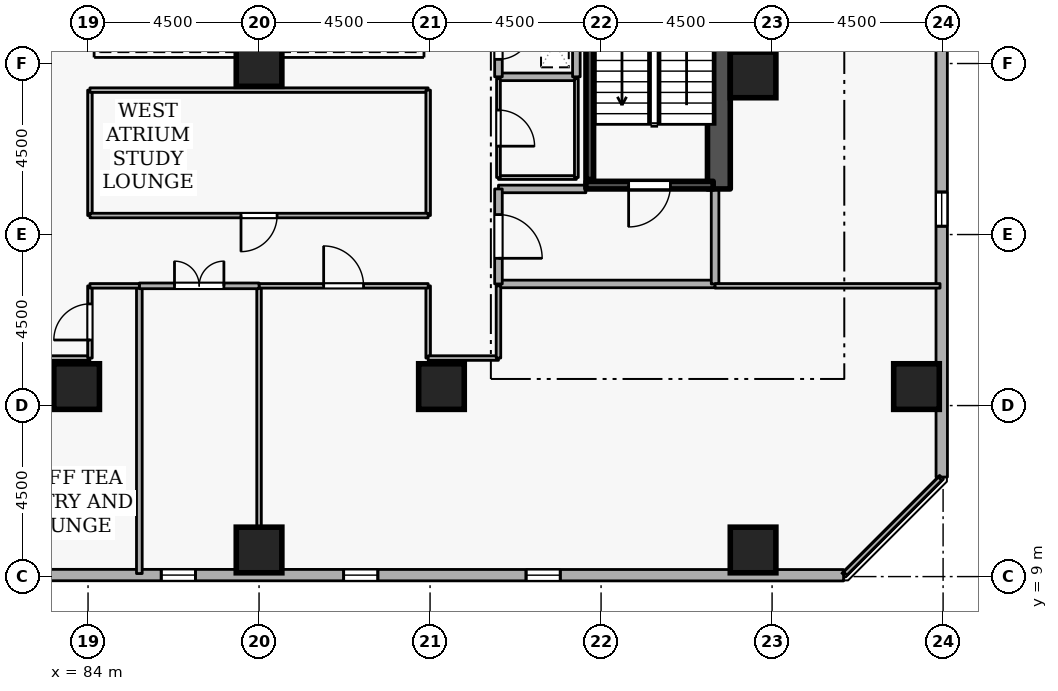
"""IFC4 building model, lengths in metres.
Left out: names, types, materials, properties, quantities, classifications, styles, units other than length and angle.
Written with IfcOpenShell. Run it as: python <this file> out.ifc"""

import sys

from ifc_helpers import new_model, si_unit, direction, frame, frame_2d, origin, origin_2d, place, context, subcontext, project, spatial, rectangle, extrude, element, fill, save


model = new_model("IFC4")
c1 = context("Model", 3, precision=1e-05, world=origin(), true_north=direction((0.0, 1.0)))
c2 = subcontext(c1, "Body", "Model", "MODEL_VIEW")
j1 = project(units=[si_unit("LENGTHUNIT", "METRE"), si_unit("PLANEANGLEUNIT", "RADIAN")], contexts=[c1])
p1 = place(None, origin())
s1 = spatial("IfcSite", under=j1, at=p1, CompositionType="ELEMENT")
p2 = place(p1, origin())
s2 = spatial("IfcBuilding", under=s1, at=p2, CompositionType="ELEMENT")
p3 = place(p2, frame((0.0, 0.0, 87.3)))
s3 = spatial("IfcBuildingStorey", under=s2, at=p3, CompositionType="ELEMENT", Elevation=87.3)
p4 = place(p3, frame((100.6, 19.2, 0.0), z_axis=(0.0, 0.0, 1.0), x_axis=(0.0, 1.0, 0.0)))
e1 = element("IfcWall", 1, at=p4, inside=s3, PredefinedType="SHEAR", context=c2, shape_type="SweptSolid", body=[
    extrude(rectangle(XDim=15.6, YDim=0.6, at=frame_2d((7.8, 0.0))), origin(), (0.0, 0.0, 1.0), 3.6),
])
for number, where, z_axis, x_axis in (
    (2, (105.8, 14.0, 0.0), (0.0, 0.0, 1.0), (1.0, 0.0, 0.0)),
    (3, (101.5, 9.7, 0.0), (0.0, 0.0, 1.0), (1.0, 0.0, 0.0)),
    (4, (88.5, 9.7, 0.0), (0.0, 0.0, 1.0), (1.0, 0.0, 0.0)),
    (5, (93.3, 14.0, 0.0), (0.0, 0.0, 1.0), (1.0, 0.0, 0.0)),
    (6, (83.7, 14.0, 0.0), (0.0, 0.0, 1.0), (1.0, 0.0, 0.0)),
    (7, (101.5, 22.2, 0.0), (0.0, 0.0, 1.0), (1.0, 0.0, 0.0)),
    (8, (88.5, 22.5, 0.0), (0.0, 0.0, 1.0), (1.0, 0.0, 0.0)),
):
    element("IfcColumn", number, at=place(p3, frame(where, z_axis=z_axis, x_axis=x_axis)), inside=s3, PredefinedType="COLUMN", context=c2, shape_type="SweptSolid", body=[
        extrude(rectangle(XDim=1.2, YDim=1.2, at=origin_2d()), origin(), (0.0, 0.0, 1.0), 3.6),
    ])
p5 = place(p3, frame((69.726, 9.044, 0.0), z_axis=(0.0, 0.0, 1.0), x_axis=(0.999999970468, -0.000243032466, 0.0)))
e9 = element("IfcWall", 9, at=p5, inside=s3, PredefinedType="STANDARD", context=c2, shape_type="SweptSolid", body=[
    extrude(rectangle(XDim=34.155, YDim=0.3, at=frame_2d((17.078, 0.0))), origin(), (0.0, 0.0, 1.0), 2.7),
])
p6 = place(p5, frame((1.8, 0.0, 0.72)))
e10 = element("IfcOpeningElement", 10, at=p6, cuts=e9, PredefinedType="OPENING", context=c2, shape_type="SweptSolid", body=[
    extrude(rectangle(XDim=0.9, YDim=1.75, at=frame_2d((0.45, 0.875))), frame((0.0, 0.16, 0.0), z_axis=(0.0, -1.0, 0.0), x_axis=(1.0, 0.0, 0.0)), (0.0, 0.0, 1.0), 0.32),
])
p7 = place(p5, frame((11.4, 0.0, 0.72)))
e11 = element("IfcOpeningElement", 11, at=p7, cuts=e9, PredefinedType="OPENING", context=c2, shape_type="SweptSolid", body=[
    extrude(rectangle(XDim=0.9, YDim=1.75, at=frame_2d((0.45, 0.875))), frame((0.0, 0.16, 0.0), z_axis=(0.0, -1.0, 0.0), x_axis=(1.0, 0.0, 0.0)), (0.0, 0.0, 1.0), 0.32),
])
p8 = place(p5, frame((16.2, 0.0, 0.72)))
e12 = element("IfcOpeningElement", 12, at=p8, cuts=e9, PredefinedType="OPENING", context=c2, shape_type="SweptSolid", body=[
    extrude(rectangle(XDim=0.9, YDim=1.75, at=frame_2d((0.45, 0.875))), frame((0.0, 0.16, 0.0), z_axis=(0.0, -1.0, 0.0), x_axis=(1.0, 0.0, 0.0)), (0.0, 0.0, 1.0), 0.32),
])
p9 = place(p5, frame((21.0, 0.0, 0.72)))
e13 = element("IfcOpeningElement", 13, at=p9, cuts=e9, PredefinedType="OPENING", context=c2, shape_type="SweptSolid", body=[
    extrude(rectangle(XDim=0.9, YDim=1.75, at=frame_2d((0.45, 0.875))), frame((0.0, 0.16, 0.0), z_axis=(0.0, -1.0, 0.0), x_axis=(1.0, 0.0, 0.0)), (0.0, 0.0, 1.0), 0.32),
])
p10 = place(p5, frame((25.8, 0.0, 0.72)))
e14 = element("IfcOpeningElement", 14, at=p10, cuts=e9, PredefinedType="OPENING", context=c2, shape_type="SweptSolid", body=[
    extrude(rectangle(XDim=0.9, YDim=1.75, at=frame_2d((0.45, 0.875))), frame((0.0, 0.16, 0.0), z_axis=(0.0, -1.0, 0.0), x_axis=(1.0, 0.0, 0.0)), (0.0, 0.0, 1.0), 0.32),
])
p11 = place(p3, frame((106.465, 11.619, 0.0), z_axis=(0.0, 0.0, 1.0), x_axis=(-0.000243032466, 0.999999970468, 0.0)))
e15 = element("IfcWall", 15, at=p11, inside=s3, PredefinedType="STANDARD", context=c2, shape_type="SweptSolid", body=[
    extrude(rectangle(XDim=34.155, YDim=0.3, at=frame_2d((17.078, 0.0))), origin(), (0.0, 0.0, 1.0), 2.7),
])
p12 = place(p11, frame((6.6, 0.0, 0.72)))
e16 = element("IfcOpeningElement", 16, at=p12, cuts=e15, PredefinedType="OPENING", context=c2, shape_type="SweptSolid", body=[
    extrude(rectangle(XDim=0.9, YDim=1.75, at=frame_2d((0.45, 0.875))), frame((0.0, 0.16, 0.0), z_axis=(0.0, -1.0, 0.0), x_axis=(1.0, 0.0, 0.0)), (0.0, 0.0, 1.0), 0.32),
])
p13 = place(p11, frame((11.4, 0.0, 0.72)))
e17 = element("IfcOpeningElement", 17, at=p13, cuts=e15, PredefinedType="OPENING", context=c2, shape_type="SweptSolid", body=[
    extrude(rectangle(XDim=0.9, YDim=1.75, at=frame_2d((0.45, 0.875))), frame((0.0, 0.16, 0.0), z_axis=(0.0, -1.0, 0.0), x_axis=(1.0, 0.0, 0.0)), (0.0, 0.0, 1.0), 0.32),
])
p14 = place(p11, frame((21.0, 0.0, 0.72)))
e18 = element("IfcOpeningElement", 18, at=p14, cuts=e15, PredefinedType="OPENING", context=c2, shape_type="SweptSolid", body=[
    extrude(rectangle(XDim=0.9, YDim=1.75, at=frame_2d((0.45, 0.875))), frame((0.0, 0.16, 0.0), z_axis=(0.0, -1.0, 0.0), x_axis=(1.0, 0.0, 0.0)), (0.0, 0.0, 1.0), 0.32),
])
p15 = place(p11, frame((25.8, 0.0, 0.72)))
e19 = element("IfcOpeningElement", 19, at=p15, cuts=e15, PredefinedType="OPENING", context=c2, shape_type="SweptSolid", body=[
    extrude(rectangle(XDim=0.9, YDim=1.75, at=frame_2d((0.45, 0.875))), frame((0.0, 0.16, 0.0), z_axis=(0.0, -1.0, 0.0), x_axis=(1.0, 0.0, 0.0)), (0.0, 0.0, 1.0), 0.32),
])
p16 = place(p11, frame((30.6, 0.0, 0.72)))
e20 = element("IfcOpeningElement", 20, at=p16, cuts=e15, PredefinedType="OPENING", context=c2, shape_type="SweptSolid", body=[
    extrude(rectangle(XDim=0.9, YDim=1.75, at=frame_2d((0.45, 0.875))), frame((0.0, 0.16, 0.0), z_axis=(0.0, -1.0, 0.0), x_axis=(1.0, 0.0, 0.0)), (0.0, 0.0, 1.0), 0.32),
])
p17 = place(p3, frame((100.45, 19.3, 0.0), z_axis=(0.0, 0.0, 1.0), x_axis=(-1.0, 0.0, 0.0)))
e21 = element("IfcWall", 21, at=p17, inside=s3, PredefinedType="SHEAR", context=c2, shape_type="SweptSolid", body=[
    extrude(rectangle(XDim=3.35, YDim=0.2, at=frame_2d((1.675, 0.0))), origin(), (0.0, 0.0, 1.0), 3.6),
])
p18 = place(p17, frame((1.125, 0.0, 0.0)))
e22 = element("IfcOpeningElement", 22, at=p18, cuts=e21, PredefinedType="OPENING", context=c2, shape_type="SweptSolid", body=[
    extrude(rectangle(XDim=1.1, YDim=2.1, at=frame_2d((0.55, 1.05))), frame((0.0, 0.11, 0.0), z_axis=(0.0, -1.0, 0.0), x_axis=(1.0, 0.0, 0.0)), (0.0, 0.0, 1.0), 0.22),
])
p19 = place(p3, frame((97.203, 26.55, 0.0), z_axis=(0.0, 0.0, 1.0), x_axis=(0.0, -1.0, 0.0)))
e23 = element("IfcWall", 23, at=p19, inside=s3, PredefinedType="SHEAR", context=c2, shape_type="SweptSolid", body=[
    extrude(rectangle(XDim=7.1, YDim=0.2, at=frame_2d((3.55, 0.0))), origin(), (0.0, 0.0, 1.0), 3.6),
])
p20 = place(p3, frame((94.8, 16.7, 0.0), z_axis=(0.0, 0.0, 1.0), x_axis=(1.0, 0.0, 0.0)))
e24 = element("IfcWall", 24, at=p20, inside=s3, PredefinedType="STANDARD", context=c2, shape_type="SweptSolid", body=[
    extrude(rectangle(XDim=5.7, YDim=0.2, at=frame_2d((2.85, 0.0))), origin(), (0.0, 0.0, 1.0), 3.34),
])
p21 = place(p3, frame((100.5, 16.7, 0.0), z_axis=(0.0, 0.0, 1.0), x_axis=(0.0, 1.0, 0.0)))
e25 = element("IfcWall", 25, at=p21, inside=s3, PredefinedType="STANDARD", context=c2, shape_type="SweptSolid", body=[
    extrude(rectangle(XDim=2.5, YDim=0.2, at=frame_2d((1.25, 0.0))), origin(), (0.0, 0.0, 1.0), 3.34),
])
p22 = place(p3, frame((97.1, 19.2, 0.0), z_axis=(0.0, 0.0, 1.0), x_axis=(-1.0, 0.0, 0.0)))
e26 = element("IfcWall", 26, at=p22, inside=s3, PredefinedType="STANDARD", context=c2, shape_type="SweptSolid", body=[
    extrude(rectangle(XDim=2.3, YDim=0.2, at=frame_2d((1.15, 0.0))), origin(), (0.0, 0.0, 1.0), 2.545),
])
p23 = place(p3, frame((94.8, 19.2, 0.0), z_axis=(0.0, 0.0, 1.0), x_axis=(0.0, -1.0, 0.0)))
e27 = element("IfcWall", 27, at=p23, inside=s3, PredefinedType="STANDARD", context=c2, shape_type="SweptSolid", body=[
    extrude(rectangle(XDim=2.5, YDim=0.2, at=frame_2d((1.25, 0.0))), origin(), (0.0, 0.0, 1.0), 3.34),
])
p24 = place(p23, frame((0.675, 0.0, 0.0)))
e28 = element("IfcOpeningElement", 28, at=p24, cuts=e27, PredefinedType="OPENING", context=c2, shape_type="SweptSolid", body=[
    extrude(rectangle(XDim=1.15, YDim=2.1, at=frame_2d((0.575, 1.05))), frame((0.0, 0.11, 0.0), z_axis=(0.0, -1.0, 0.0), x_axis=(1.0, 0.0, 0.0)), (0.0, 0.0, 1.0), 0.22),
])
p25 = place(p3, frame((94.8, 22.15, 0.0), z_axis=(0.0, 0.0, 1.0), x_axis=(1.0, 0.0, 0.0)))
e29 = element("IfcWall", 29, at=p25, inside=s3, PredefinedType="STANDARD", context=c2, shape_type="SweptSolid", body=[
    extrude(rectangle(XDim=2.05, YDim=0.2, at=frame_2d((1.025, 0.0))), origin(), (0.0, 0.0, 1.0), 3.34),
])
p26 = place(p3, frame((96.85, 22.15, 0.0), z_axis=(0.0, 0.0, 1.0), x_axis=(0.0, 1.0, 0.0)))
e30 = element("IfcWall", 30, at=p26, inside=s3, PredefinedType="STANDARD", context=c2, shape_type="SweptSolid", body=[
    extrude(rectangle(XDim=1.8, YDim=0.2, at=frame_2d((0.9, 0.0))), origin(), (0.0, 0.0, 1.0), 3.34),
])
p27 = place(p3, frame((94.8, 23.95, 0.0), z_axis=(0.0, 0.0, 1.0), x_axis=(0.0, -1.0, 0.0)))
e31 = element("IfcWall", 31, at=p27, inside=s3, PredefinedType="STANDARD", context=c2, shape_type="SweptSolid", body=[
    extrude(rectangle(XDim=1.8, YDim=0.2, at=frame_2d((0.9, 0.0))), origin(), (0.0, 0.0, 1.0), 3.34),
])
p28 = place(p27, frame((0.46, 0.0, 0.0)))
e32 = element("IfcOpeningElement", 32, at=p28, cuts=e31, PredefinedType="OPENING", context=c2, shape_type="SweptSolid", body=[
    extrude(rectangle(XDim=0.88, YDim=2.04, at=frame_2d((0.44, 1.02))), frame((0.0, 0.11, 0.0), z_axis=(0.0, -1.0, 0.0), x_axis=(1.0, 0.0, 0.0)), (0.0, 0.0, 1.0), 0.22),
])
p29 = place(p3, frame((94.8, 19.5, 0.0), z_axis=(0.0, 0.0, 1.0), x_axis=(1.0, 0.0, 0.0)))
e33 = element("IfcWall", 33, at=p29, inside=s3, PredefinedType="PARTITIONING", context=c2, shape_type="SweptSolid", body=[
    extrude(rectangle(XDim=2.05, YDim=0.1, at=frame_2d((1.025, 0.0))), origin(), (0.0, 0.0, 1.0), 2.545),
])
p30 = place(p3, frame((96.85, 19.5, 0.0), z_axis=(0.0, 0.0, 1.0), x_axis=(0.0, 1.0, 0.0)))
e34 = element("IfcWall", 34, at=p30, inside=s3, PredefinedType="PARTITIONING", context=c2, shape_type="SweptSolid", body=[
    extrude(rectangle(XDim=2.6, YDim=0.1, at=frame_2d((1.3, 0.0))), origin(), (0.0, 0.0, 1.0), 3.34),
])
p31 = place(p3, frame((94.8, 22.1, 0.0), z_axis=(0.0, 0.0, 1.0), x_axis=(0.0, -1.0, 0.0)))
e35 = element("IfcWall", 35, at=p31, inside=s3, PredefinedType="PARTITIONING", context=c2, shape_type="SweptSolid", body=[
    extrude(rectangle(XDim=2.6, YDim=0.1, at=frame_2d((1.3, 0.0))), origin(), (0.0, 0.0, 1.0), 3.34),
])
p32 = place(p31, frame((0.825, 0.0, 0.0)))
e36 = element("IfcOpeningElement", 36, at=p32, cuts=e35, PredefinedType="OPENING", context=c2, shape_type="SweptSolid", body=[
    extrude(rectangle(XDim=0.95, YDim=2.1, at=frame_2d((0.475, 1.05))), frame((0.0, 0.06, 0.0), z_axis=(0.0, -1.0, 0.0), x_axis=(1.0, 0.0, 0.0)), (0.0, 0.0, 1.0), 0.12),
])
p33 = place(p3, frame((92.95, 16.65, 0.0), z_axis=(0.0, 0.0, 1.0), x_axis=(0.0, -1.0, 0.0)))
e37 = element("IfcWall", 37, at=p33, inside=s3, PredefinedType="PARTITIONING", context=c2, shape_type="SweptSolid", body=[
    extrude(rectangle(XDim=1.9, YDim=0.12, at=frame_2d((0.95, 0.0))), origin(), (0.0, 0.0, 1.0), 3.34),
])
p34 = place(p3, frame((92.95, 14.75, 0.0), z_axis=(0.0, 0.0, 1.0), x_axis=(1.0, 0.0, 0.0)))
e38 = element("IfcWall", 38, at=p34, inside=s3, PredefinedType="PARTITIONING", context=c2, shape_type="SweptSolid", body=[
    extrude(rectangle(XDim=1.85, YDim=0.12, at=frame_2d((0.925, 0.0))), origin(), (0.0, 0.0, 1.0), 3.34),
])
p35 = place(p3, frame((94.8, 14.75, 0.0), z_axis=(0.0, 0.0, 1.0), x_axis=(0.0, 1.0, 0.0)))
e39 = element("IfcWall", 39, at=p35, inside=s3, PredefinedType="PARTITIONING", context=c2, shape_type="SweptSolid", body=[
    extrude(rectangle(XDim=1.9, YDim=0.12, at=frame_2d((0.95, 0.0))), origin(), (0.0, 0.0, 1.0), 3.34),
])
p36 = place(p3, frame((100.5, 16.65, 0.0), z_axis=(0.0, 0.0, 1.0), x_axis=(1.0, 0.0, 0.0)))
e40 = element("IfcWall", 40, at=p36, inside=s3, PredefinedType="PARTITIONING", context=c2, shape_type="SweptSolid", body=[
    extrude(rectangle(XDim=5.92, YDim=0.12, at=frame_2d((2.96, 0.0))), origin(), (0.0, 0.0, 1.0), 3.34),
])
p37 = place(p3, frame((106.42, 11.575, 0.0), z_axis=(0.0, 0.0, 1.0), x_axis=(-0.707106781187, -0.707106781187, 0.0)))
e41 = element("IfcWall", 41, at=p37, inside=s3, PredefinedType="PARTITIONING", context=c2, shape_type="SweptSolid", body=[
    extrude(rectangle(XDim=3.528, YDim=0.12, at=frame_2d((1.764, 0.0))), origin(), (0.0, 0.0, 1.0), 3.34),
])
p38 = place(p3, frame((88.5, 9.08, 0.0), z_axis=(0.0, 0.0, 1.0), x_axis=(0.0, 1.0, 0.0)))
e42 = element("IfcWall", 42, at=p38, inside=s3, PredefinedType="PARTITIONING", context=c2, shape_type="SweptSolid", body=[
    extrude(rectangle(XDim=7.57, YDim=0.12, at=frame_2d((3.785, 0.0))), origin(), (0.0, 0.0, 1.0), 2.932),
])
p39 = place(p3, frame((88.5, 16.65, 0.0), z_axis=(0.0, 0.0, 1.0), x_axis=(1.0, 0.0, 0.0)))
e43 = element("IfcWall", 43, at=p39, inside=s3, PredefinedType="PARTITIONING", context=c2, shape_type="SweptSolid", body=[
    extrude(rectangle(XDim=4.45, YDim=0.12, at=frame_2d((2.225, 0.0))), origin(), (0.0, 0.0, 1.0), 3.34),
])
p40 = place(p39, frame((1.7, 0.0, 0.0)))
e44 = element("IfcOpeningElement", 44, at=p40, cuts=e43, PredefinedType="OPENING", context=c2, shape_type="SweptSolid", body=[
    extrude(rectangle(XDim=1.05, YDim=2.1, at=frame_2d((0.525, 1.05))), frame((0.0, 0.07, 0.0), z_axis=(0.0, -1.0, 0.0), x_axis=(1.0, 0.0, 0.0)), (0.0, 0.0, 1.0), 0.14),
])
p41 = place(p3, frame((85.35, 9.08, 0.0), z_axis=(0.0, 0.0, 1.0), x_axis=(0.0, 1.0, 0.0)))
e45 = element("IfcWall", 45, at=p41, inside=s3, PredefinedType="PARTITIONING", context=c2, shape_type="SweptSolid", body=[
    extrude(rectangle(XDim=7.57, YDim=0.15, at=frame_2d((3.785, 0.0))), origin(), (0.0, 0.0, 1.0), 3.34),
])
p42 = place(p3, frame((85.35, 16.65, 0.0), z_axis=(0.0, 0.0, 1.0), x_axis=(1.0, 0.0, 0.0)))
e46 = element("IfcWall", 46, at=p42, inside=s3, PredefinedType="PARTITIONING", context=c2, shape_type="SweptSolid", body=[
    extrude(rectangle(XDim=3.15, YDim=0.15, at=frame_2d((1.575, 0.0))), origin(), (0.0, 0.0, 1.0), 3.34),
])
p43 = place(p42, frame((0.925, 0.0, 0.0)))
e47 = element("IfcOpeningElement", 47, at=p43, cuts=e46, PredefinedType="OPENING", context=c2, shape_type="SweptSolid", body=[
    extrude(rectangle(XDim=1.3, YDim=2.12, at=frame_2d((0.65, 1.06))), frame((0.0, 0.085, 0.0), z_axis=(0.0, -1.0, 0.0), x_axis=(1.0, 0.0, 0.0)), (0.0, 0.0, 1.0), 0.17),
])
p44 = place(p3, frame((82.2, 14.75, 0.0), z_axis=(0.0, 0.0, 1.0), x_axis=(1.0, 0.0, 0.0)))
e48 = element("IfcWall", 48, at=p44, inside=s3, PredefinedType="PARTITIONING", context=c2, shape_type="SweptSolid", body=[
    extrude(rectangle(XDim=1.85, YDim=0.12, at=frame_2d((0.925, 0.0))), origin(), (0.0, 0.0, 1.0), 3.34),
])
p45 = place(p3, frame((84.05, 14.75, 0.0), z_axis=(0.0, 0.0, 1.0), x_axis=(0.0, 1.0, 0.0)))
e49 = element("IfcWall", 49, at=p45, inside=s3, PredefinedType="PARTITIONING", context=c2, shape_type="SweptSolid", body=[
    extrude(rectangle(XDim=1.9, YDim=0.12, at=frame_2d((0.95, 0.0))), origin(), (0.0, 0.0, 1.0), 3.34),
])
p46 = place(p45, frame((0.475, 0.0, 0.0)))
e50 = element("IfcOpeningElement", 50, at=p46, cuts=e49, PredefinedType="OPENING", context=c2, shape_type="SweptSolid", body=[
    extrude(rectangle(XDim=0.95, YDim=2.1, at=frame_2d((0.475, 1.05))), frame((0.0, 0.07, 0.0), z_axis=(0.0, -1.0, 0.0), x_axis=(1.0, 0.0, 0.0)), (0.0, 0.0, 1.0), 0.14),
])
p47 = place(p3, frame((84.05, 16.65, 0.0), z_axis=(0.0, 0.0, 1.0), x_axis=(1.0, 0.0, 0.0)))
e51 = element("IfcWall", 51, at=p47, inside=s3, PredefinedType="PARTITIONING", context=c2, shape_type="SweptSolid", body=[
    extrude(rectangle(XDim=1.3, YDim=0.12, at=frame_2d((0.65, 0.0))), origin(), (0.0, 0.0, 1.0), 3.34),
])
p48 = place(p3, frame((84.05, 18.5, 0.0), z_axis=(0.0, 0.0, 1.0), x_axis=(0.0, 1.0, 0.0)))
e52 = element("IfcWall", 52, at=p48, inside=s3, PredefinedType="PARTITIONING", context=c2, shape_type="SweptSolid", body=[
    extrude(rectangle(XDim=3.3, YDim=0.12, at=frame_2d((1.65, 0.0))), origin(), (0.0, 0.0, 1.0), 3.34),
])
p49 = place(p3, frame((84.05, 21.8, 0.0), z_axis=(0.0, 0.0, 1.0), x_axis=(1.0, 0.0, 0.0)))
e53 = element("IfcWall", 53, at=p49, inside=s3, PredefinedType="PARTITIONING", context=c2, shape_type="SweptSolid", body=[
    extrude(rectangle(XDim=8.9, YDim=0.12, at=frame_2d((4.45, 0.0))), origin(), (0.0, 0.0, 1.0), 3.34),
])
p50 = place(p3, frame((92.95, 21.8, 0.0), z_axis=(0.0, 0.0, 1.0), x_axis=(0.0, -1.0, 0.0)))
e54 = element("IfcWall", 54, at=p50, inside=s3, PredefinedType="PARTITIONING", context=c2, shape_type="SweptSolid", body=[
    extrude(rectangle(XDim=3.3, YDim=0.12, at=frame_2d((1.65, 0.0))), origin(), (0.0, 0.0, 1.0), 3.34),
])
p51 = place(p3, frame((92.95, 18.5, 0.0), z_axis=(0.0, 0.0, 1.0), x_axis=(-1.0, 0.0, 0.0)))
e55 = element("IfcWall", 55, at=p51, inside=s3, PredefinedType="PARTITIONING", context=c2, shape_type="SweptSolid", body=[
    extrude(rectangle(XDim=8.9, YDim=0.12, at=frame_2d((4.45, 0.0))), origin(), (0.0, 0.0, 1.0), 3.34),
])
p52 = place(p51, frame((3.975, 0.0, 0.0)))
e56 = element("IfcOpeningElement", 56, at=p52, cuts=e55, PredefinedType="OPENING", context=c2, shape_type="SweptSolid", body=[
    extrude(rectangle(XDim=0.95, YDim=2.1, at=frame_2d((0.475, 1.05))), frame((0.0, 0.07, 0.0), z_axis=(0.0, -1.0, 0.0), x_axis=(1.0, 0.0, 0.0)), (0.0, 0.0, 1.0), 0.14),
])
p53 = place(p8, origin())
e57 = element("IfcWindow", 57, at=p53, inside=s3, PartitioningType="SINGLE_PANEL", PredefinedType="WINDOW", context=c2, shape_type="SweptSolid", body=[
    extrude(rectangle(XDim=0.9, YDim=1.75, at=frame_2d((0.45, 0.875))), frame((0.0, 0.03, 0.0), z_axis=(0.0, -1.0, 0.0), x_axis=(1.0, 0.0, 0.0)), (0.0, 0.0, 1.0), 0.06),
])
fill(e12, e57)
p54 = place(p9, origin())
e58 = element("IfcWindow", 58, at=p54, inside=s3, PartitioningType="SINGLE_PANEL", PredefinedType="WINDOW", context=c2, shape_type="SweptSolid", body=[
    extrude(rectangle(XDim=0.9, YDim=1.75, at=frame_2d((0.45, 0.875))), frame((0.0, 0.03, 0.0), z_axis=(0.0, -1.0, 0.0), x_axis=(1.0, 0.0, 0.0)), (0.0, 0.0, 1.0), 0.06),
])
fill(e13, e58)
p55 = place(p10, origin())
e59 = element("IfcWindow", 59, at=p55, inside=s3, PartitioningType="SINGLE_PANEL", PredefinedType="WINDOW", context=c2, shape_type="SweptSolid", body=[
    extrude(rectangle(XDim=0.9, YDim=1.75, at=frame_2d((0.45, 0.875))), frame((0.0, 0.03, 0.0), z_axis=(0.0, -1.0, 0.0), x_axis=(1.0, 0.0, 0.0)), (0.0, 0.0, 1.0), 0.06),
])
fill(e14, e59)
p56 = place(p12, origin())
e60 = element("IfcWindow", 60, at=p56, inside=s3, PartitioningType="SINGLE_PANEL", PredefinedType="WINDOW", context=c2, shape_type="SweptSolid", body=[
    extrude(rectangle(XDim=0.9, YDim=1.75, at=frame_2d((0.45, 0.875))), frame((0.0, 0.03, 0.0), z_axis=(0.0, -1.0, 0.0), x_axis=(1.0, 0.0, 0.0)), (0.0, 0.0, 1.0), 0.06),
])
fill(e16, e60)
p57 = place(p18, origin())
e61 = element("IfcDoor", 61, at=p57, inside=s3, OperationType="SINGLE_SWING_RIGHT", PredefinedType="DOOR", context=c2, shape_type="SweptSolid", body=[
    extrude(rectangle(XDim=1.1, YDim=2.1, at=frame_2d((0.55, 1.05))), frame((0.0, 0.025, 0.0), z_axis=(0.0, -1.0, 0.0), x_axis=(1.0, 0.0, 0.0)), (0.0, 0.0, 1.0), 0.05),
])
fill(e22, e61)
p58 = place(p24, origin())
e62 = element("IfcDoor", 62, at=p58, inside=s3, OperationType="SINGLE_SWING_RIGHT", PredefinedType="DOOR", context=c2, shape_type="SweptSolid", body=[
    extrude(rectangle(XDim=1.15, YDim=2.1, at=frame_2d((0.575, 1.05))), frame((0.0, 0.025, 0.0), z_axis=(0.0, -1.0, 0.0), x_axis=(1.0, 0.0, 0.0)), (0.0, 0.0, 1.0), 0.05),
])
fill(e28, e62)
p59 = place(p28, origin())
e63 = element("IfcDoor", 63, at=p59, inside=s3, OperationType="SINGLE_SWING_LEFT", PredefinedType="DOOR", context=c2, shape_type="SweptSolid", body=[
    extrude(rectangle(XDim=0.88, YDim=2.04, at=frame_2d((0.44, 1.02))), frame((0.0, 0.025, 0.0), z_axis=(0.0, -1.0, 0.0), x_axis=(1.0, 0.0, 0.0)), (0.0, 0.0, 1.0), 0.05),
])
fill(e32, e63)
p60 = place(p32, origin())
e64 = element("IfcDoor", 64, at=p60, inside=s3, OperationType="SINGLE_SWING_RIGHT", PredefinedType="DOOR", context=c2, shape_type="SweptSolid", body=[
    extrude(rectangle(XDim=0.95, YDim=2.1, at=frame_2d((0.475, 1.05))), frame((0.0, 0.025, 0.0), z_axis=(0.0, -1.0, 0.0), x_axis=(1.0, 0.0, 0.0)), (0.0, 0.0, 1.0), 0.05),
])
fill(e36, e64)
p61 = place(p40, origin())
e65 = element("IfcDoor", 65, at=p61, inside=s3, OperationType="SINGLE_SWING_LEFT", PredefinedType="DOOR", context=c2, shape_type="SweptSolid", body=[
    extrude(rectangle(XDim=1.05, YDim=2.1, at=frame_2d((0.525, 1.05))), frame((0.0, 0.025, 0.0), z_axis=(0.0, -1.0, 0.0), x_axis=(1.0, 0.0, 0.0)), (0.0, 0.0, 1.0), 0.05),
])
fill(e44, e65)
p62 = place(p43, origin())
e66 = element("IfcDoor", 66, at=p62, inside=s3, OperationType="DOUBLE_DOOR_SINGLE_SWING", PredefinedType="DOOR", context=c2, shape_type="SweptSolid", body=[
    extrude(rectangle(XDim=1.3, YDim=2.12, at=frame_2d((0.65, 1.06))), frame((0.0, 0.025, 0.0), z_axis=(0.0, -1.0, 0.0), x_axis=(1.0, 0.0, 0.0)), (0.0, 0.0, 1.0), 0.05),
])
fill(e47, e66)
p63 = place(p46, origin())
e67 = element("IfcDoor", 67, at=p63, inside=s3, OperationType="SINGLE_SWING_LEFT", PredefinedType="DOOR", context=c2, shape_type="SweptSolid", body=[
    extrude(rectangle(XDim=0.95, YDim=2.1, at=frame_2d((0.475, 1.05))), frame((0.0, 0.025, 0.0), z_axis=(0.0, -1.0, 0.0), x_axis=(1.0, 0.0, 0.0)), (0.0, 0.0, 1.0), 0.05),
])
fill(e50, e67)
p64 = place(p52, origin())
e68 = element("IfcDoor", 68, at=p64, inside=s3, OperationType="SINGLE_SWING_RIGHT", PredefinedType="DOOR", context=c2, shape_type="SweptSolid", body=[
    extrude(rectangle(XDim=0.95, YDim=2.1, at=frame_2d((0.475, 1.05))), frame((0.0, 0.025, 0.0), z_axis=(0.0, -1.0, 0.0), x_axis=(1.0, 0.0, 0.0)), (0.0, 0.0, 1.0), 0.05),
])
fill(e56, e68)
save(model, sys.argv[1])
